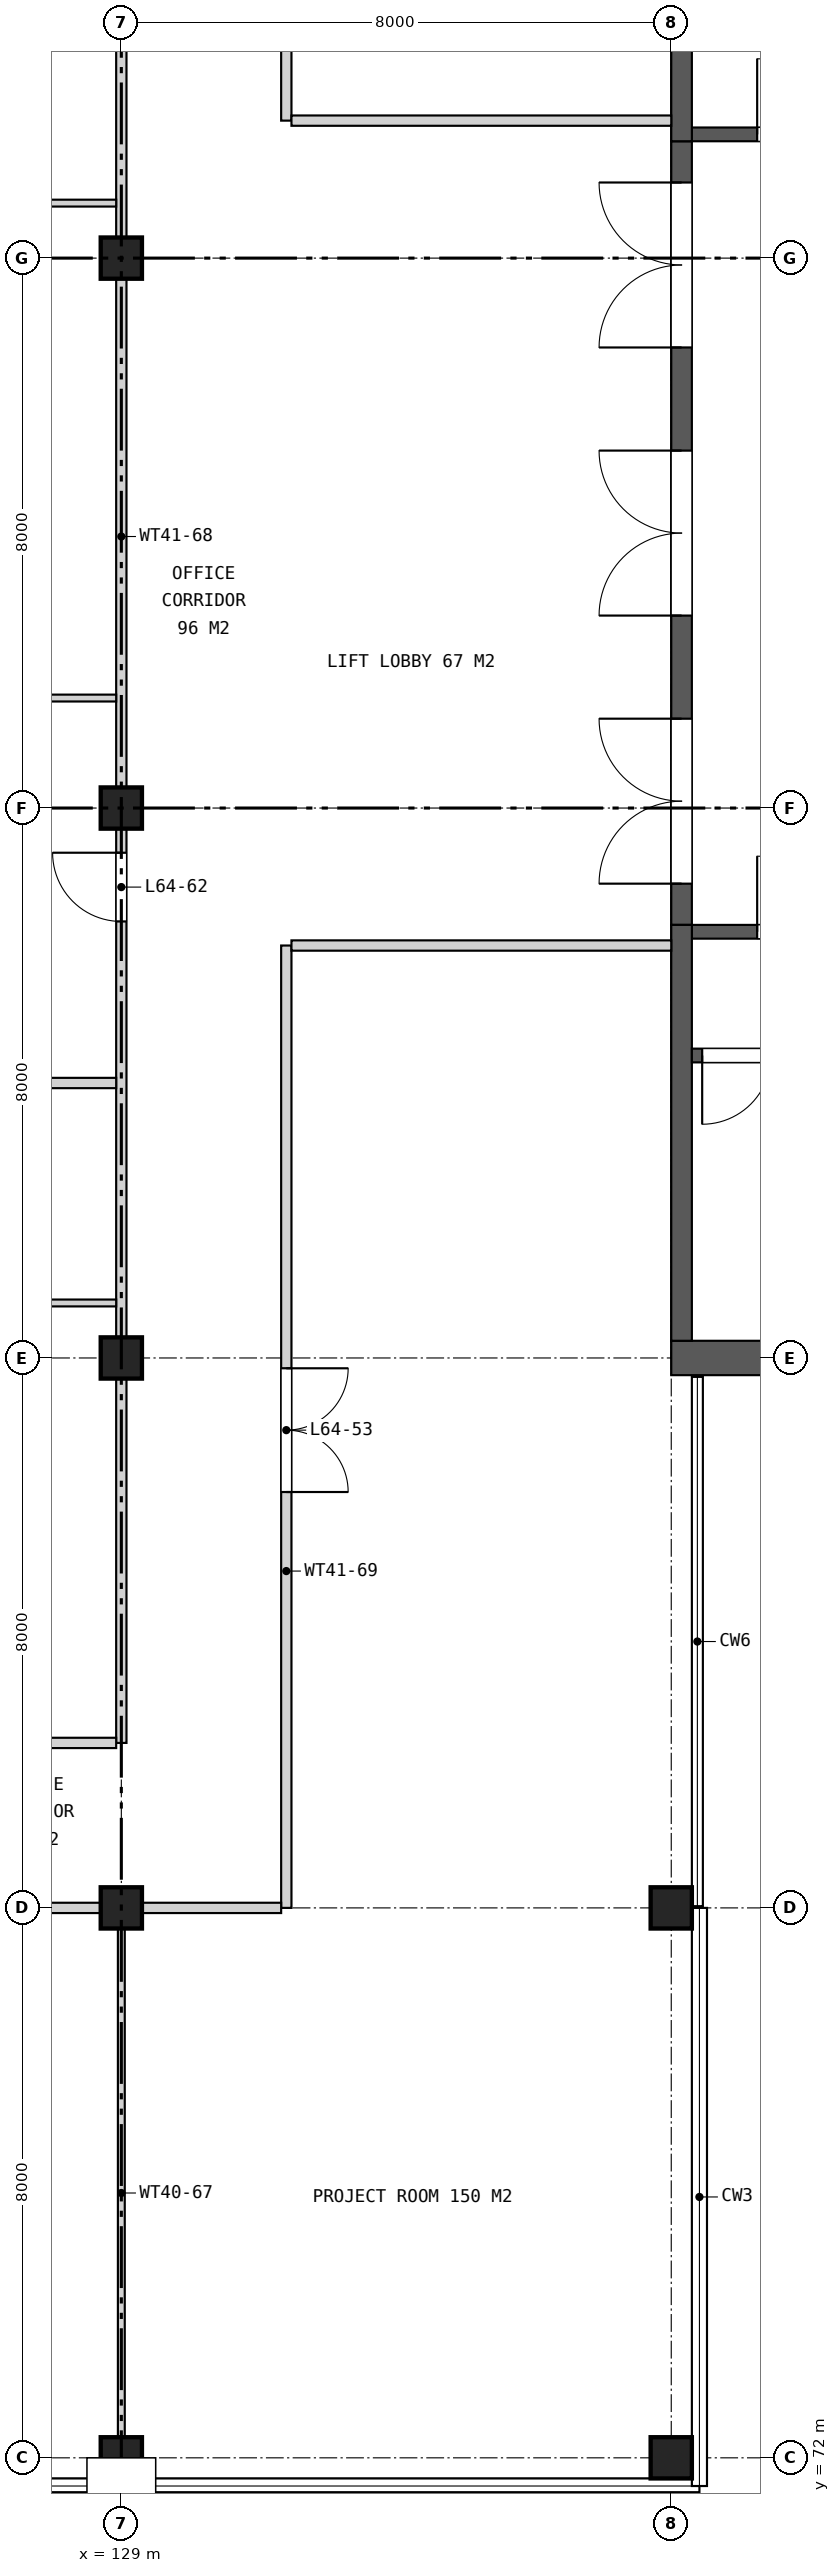
"""IFC4 building model, lengths in metres.
Left out: names, types, materials, properties, quantities, classifications, styles, units other than length and angle.
Written with IfcOpenShell. Run it as: python <this file> out.ifc"""

import sys

from ifc_helpers import new_model, si_unit, direction, frame, frame_2d, origin, origin_2d, place, context, subcontext, project, spatial, rectangle, extrude, element, fill, save


model = new_model("IFC4")
c1 = context("Model", 3, precision=1e-05, world=origin(), true_north=direction((0.0, 1.0)))
c2 = subcontext(c1, "Body", "Model", "MODEL_VIEW")
j1 = project(units=[si_unit("LENGTHUNIT", "METRE"), si_unit("PLANEANGLEUNIT", "RADIAN")], contexts=[c1])
p1 = place(None, origin())
s1 = spatial("IfcSite", under=j1, at=p1, CompositionType="ELEMENT")
p2 = place(p1, origin())
s2 = spatial("IfcBuilding", under=s1, at=p2, CompositionType="ELEMENT")
p3 = place(p2, frame((0.0, 0.0, 295.5)))
s3 = spatial("IfcBuildingStorey", under=s2, at=p3, CompositionType="ELEMENT", Elevation=295.5)
for number, where, z_axis, x_axis in (
    (1, (129.0, 72.0, 0.0), (0.0, 0.0, 1.0), (1.0, 0.0, 0.0)),
    (2, (129.0, 80.0, 0.0), (0.0, 0.0, 1.0), (1.0, 0.0, 0.0)),
    (3, (129.0, 88.0, 0.0), (0.0, 0.0, 1.0), (1.0, 0.0, 0.0)),
    (4, (129.0, 96.0, 0.0), (0.0, 0.0, 1.0), (1.0, 0.0, 0.0)),
    (5, (129.0, 104.0, 0.0), (0.0, 0.0, 1.0), (1.0, 0.0, 0.0)),
    (6, (137.0, 72.0, 0.0), (0.0, 0.0, 1.0), (1.0, 0.0, 0.0)),
    (7, (137.0, 80.0, 0.0), (0.0, 0.0, 1.0), (1.0, 0.0, 0.0)),
):
    element("IfcColumn", number, at=place(p3, frame(where, z_axis=z_axis, x_axis=x_axis)), inside=s3, PredefinedType="COLUMN", context=c2, shape_type="SweptSolid", body=[
        extrude(rectangle(XDim=0.6, YDim=0.6, at=origin_2d()), origin(), (0.0, 0.0, 1.0), 4.2),
    ])
p4 = place(p3, frame((137.0, 88.0, 0.0), z_axis=(0.0, 0.0, 1.0), x_axis=(1.0, 0.0, 0.0)))
e8 = element("IfcWall", 8, at=p4, inside=s3, PredefinedType="SHEAR", context=c2, shape_type="SweptSolid", body=[
    extrude(rectangle(XDim=7.1, YDim=0.5, at=frame_2d((3.55, 0.0))), origin(), (0.0, 0.0, 1.0), 4.2),
])
p5 = place(p3, frame((137.15, 94.3, 0.0), z_axis=(0.0, 0.0, 1.0), x_axis=(0.0, 1.0, 0.0)))
e9 = element("IfcWall", 9, at=p5, inside=s3, PredefinedType="SHEAR", context=c2, shape_type="SweptSolid", body=[
    extrude(rectangle(XDim=11.4, YDim=0.3, at=frame_2d((5.7, 0.0))), origin(), (0.0, 0.0, 1.0), 4.2),
])
p6 = place(p5, frame((0.6, 0.0, 0.0)))
e10 = element("IfcOpeningElement", 10, at=p6, cuts=e9, PredefinedType="OPENING", context=c2, shape_type="SweptSolid", body=[
    extrude(rectangle(XDim=2.4, YDim=2.4, at=frame_2d((1.2, 1.2))), frame((0.0, 0.16, 0.0), z_axis=(0.0, -1.0, 0.0), x_axis=(1.0, 0.0, 0.0)), (0.0, 0.0, 1.0), 0.32),
])
p7 = place(p5, frame((4.5, 0.0, 0.0)))
e11 = element("IfcOpeningElement", 11, at=p7, cuts=e9, PredefinedType="OPENING", context=c2, shape_type="SweptSolid", body=[
    extrude(rectangle(XDim=2.4, YDim=2.4, at=frame_2d((1.2, 1.2))), frame((0.0, 0.16, 0.0), z_axis=(0.0, -1.0, 0.0), x_axis=(1.0, 0.0, 0.0)), (0.0, 0.0, 1.0), 0.32),
])
p8 = place(p5, frame((8.4, 0.0, 0.0)))
e12 = element("IfcOpeningElement", 12, at=p8, cuts=e9, PredefinedType="OPENING", context=c2, shape_type="SweptSolid", body=[
    extrude(rectangle(XDim=2.4, YDim=2.4, at=frame_2d((1.2, 1.2))), frame((0.0, 0.16, 0.0), z_axis=(0.0, -1.0, 0.0), x_axis=(1.0, 0.0, 0.0)), (0.0, 0.0, 1.0), 0.32),
])
p9 = place(p3, frame((137.3, 105.8, 0.0), z_axis=(0.0, 0.0, 1.0), x_axis=(1.0, 0.0, 0.0)))
e13 = element("IfcWall", 13, at=p9, inside=s3, PredefinedType="SHEAR", context=c2, shape_type="SweptSolid", body=[
    extrude(rectangle(XDim=15.45, YDim=0.2, at=frame_2d((7.725, 0.0))), origin(), (0.0, 0.0, 1.0), 4.2),
])
p10 = place(p9, frame((0.95, 0.0, 0.0)))
e14 = element("IfcOpeningElement", 14, at=p10, cuts=e13, PredefinedType="OPENING", context=c2, shape_type="SweptSolid", body=[
    extrude(rectangle(XDim=1.1, YDim=2.1, at=frame_2d((0.55, 1.05))), frame((0.0, 0.11, 0.0), z_axis=(0.0, -1.0, 0.0), x_axis=(1.0, 0.0, 0.0)), (0.0, 0.0, 1.0), 0.22),
])
p11 = place(p3, frame((137.15, 105.7, 0.0), z_axis=(0.0, 0.0, 1.0), x_axis=(0.0, 1.0, 0.0)))
e15 = element("IfcWall", 15, at=p11, inside=s3, PredefinedType="SHEAR", context=c2, shape_type="SweptSolid", body=[
    extrude(rectangle(XDim=6.05, YDim=0.3, at=frame_2d((3.025, 0.0))), origin(), (0.0, 0.0, 1.0), 4.2),
])
p12 = place(p3, frame((137.3, 94.2, 0.0), z_axis=(0.0, 0.0, 1.0), x_axis=(1.0, 0.0, 0.0)))
e16 = element("IfcWall", 16, at=p12, inside=s3, PredefinedType="SHEAR", context=c2, shape_type="SweptSolid", body=[
    extrude(rectangle(XDim=15.45, YDim=0.2, at=frame_2d((7.725, 0.0))), origin(), (0.0, 0.0, 1.0), 4.2),
])
p13 = place(p12, frame((0.95, 0.0, 0.0)))
e17 = element("IfcOpeningElement", 17, at=p13, cuts=e16, PredefinedType="OPENING", context=c2, shape_type="SweptSolid", body=[
    extrude(rectangle(XDim=1.1, YDim=2.1, at=frame_2d((0.55, 1.05))), frame((0.0, 0.11, 0.0), z_axis=(0.0, -1.0, 0.0), x_axis=(1.0, 0.0, 0.0)), (0.0, 0.0, 1.0), 0.22),
])
p14 = place(p3, frame((137.15, 88.25, 0.0), z_axis=(0.0, 0.0, 1.0), x_axis=(0.0, 1.0, 0.0)))
e18 = element("IfcWall", 18, at=p14, inside=s3, PredefinedType="SHEAR", context=c2, shape_type="SweptSolid", body=[
    extrude(rectangle(XDim=6.05, YDim=0.3, at=frame_2d((3.025, 0.0))), origin(), (0.0, 0.0, 1.0), 4.2),
])
p15 = place(p3, frame((137.3, 92.4, 0.0), z_axis=(0.0, 0.0, 1.0), x_axis=(1.0, 0.0, 0.0)))
e19 = element("IfcWall", 19, at=p15, inside=s3, PredefinedType="SHEAR", context=c2, shape_type="SweptSolid", body=[
    extrude(rectangle(XDim=6.8, YDim=0.2, at=frame_2d((3.4, 0.0))), origin(), (0.0, 0.0, 1.0), 4.2),
])
p16 = place(p15, frame((0.15, 0.0, 0.0)))
e20 = element("IfcOpeningElement", 20, at=p16, cuts=e19, PredefinedType="OPENING", context=c2, shape_type="SweptSolid", body=[
    extrude(rectangle(XDim=1.0, YDim=2.1, at=frame_2d((0.5, 1.05))), frame((0.0, 0.11, 0.0), z_axis=(0.0, -1.0, 0.0), x_axis=(1.0, 0.0, 0.0)), (0.0, 0.0, 1.0), 0.22),
])
p17 = place(p3, frame((129.0, 71.78, 0.0), z_axis=(0.0, 0.0, 1.0), x_axis=(0.0, 1.0, 0.0)))
e21 = element("IfcWall", 21, at=p17, inside=s3, PredefinedType="PARTITIONING", context=c2, shape_type="SweptSolid", body=[
    extrude(rectangle(XDim=8.145, YDim=0.1, at=frame_2d((4.073, 0.0))), origin(), (0.0, 0.0, 1.0), 3.443),
])
p18 = place(p3, frame((129.0, 82.4, 0.0), z_axis=(0.0, 0.0, 1.0), x_axis=(0.0, 1.0, 0.0)))
e22 = element("IfcWall", 22, at=p18, inside=s3, PredefinedType="PARTITIONING", context=c2, shape_type="SweptSolid", body=[
    extrude(rectangle(XDim=35.1, YDim=0.15, at=frame_2d((17.55, 0.0))), origin(), (0.0, 0.0, 1.0), 3.443),
])
p19 = place(p18, frame((11.95, 0.0, 0.0)))
e23 = element("IfcOpeningElement", 23, at=p19, cuts=e22, PredefinedType="OPENING", context=c2, shape_type="SweptSolid", body=[
    extrude(rectangle(XDim=1.0, YDim=2.1, at=frame_2d((0.5, 1.05))), frame((0.0, 0.085, 0.0), z_axis=(0.0, -1.0, 0.0), x_axis=(1.0, 0.0, 0.0)), (0.0, 0.0, 1.0), 0.17),
])
p20 = place(p18, frame((24.65, 0.0, 0.0)))
e24 = element("IfcOpeningElement", 24, at=p20, cuts=e22, PredefinedType="OPENING", context=c2, shape_type="SweptSolid", body=[
    extrude(rectangle(XDim=1.0, YDim=2.1, at=frame_2d((0.5, 1.05))), frame((0.0, 0.085, 0.0), z_axis=(0.0, -1.0, 0.0), x_axis=(1.0, 0.0, 0.0)), (0.0, 0.0, 1.0), 0.17),
])
p21 = place(p3, frame((131.4, 80.0, 0.0), z_axis=(0.0, 0.0, 1.0), x_axis=(0.0, 1.0, 0.0)))
e25 = element("IfcWall", 25, at=p21, inside=s3, PredefinedType="PARTITIONING", context=c2, shape_type="SweptSolid", body=[
    extrude(rectangle(XDim=14.0, YDim=0.15, at=frame_2d((7.0, 0.0))), origin(), (0.0, 0.0, 1.0), 3.443),
])
p22 = place(p21, frame((6.05, 0.0, 0.0)))
e26 = element("IfcOpeningElement", 26, at=p22, cuts=e25, PredefinedType="OPENING", context=c2, shape_type="SweptSolid", body=[
    extrude(rectangle(XDim=1.8, YDim=2.1, at=frame_2d((0.9, 1.05))), frame((0.0, 0.085, 0.0), z_axis=(0.0, -1.0, 0.0), x_axis=(1.0, 0.0, 0.0)), (0.0, 0.0, 1.0), 0.17),
])
p23 = place(p3, frame((131.4, 106.0, 0.0), z_axis=(0.0, 0.0, 1.0), x_axis=(0.0, 1.0, 0.0)))
e27 = element("IfcWall", 27, at=p23, inside=s3, PredefinedType="PARTITIONING", context=c2, shape_type="SweptSolid", body=[
    extrude(rectangle(XDim=13.925, YDim=0.15, at=frame_2d((6.962, 0.0))), origin(), (0.0, 0.0, 1.0), 3.443),
])
p24 = place(p23, frame((1.25, 0.0, 0.0)))
e28 = element("IfcOpeningElement", 28, at=p24, cuts=e27, PredefinedType="OPENING", context=c2, shape_type="SweptSolid", body=[
    extrude(rectangle(XDim=1.0, YDim=2.1, at=frame_2d((0.5, 1.05))), frame((0.0, 0.085, 0.0), z_axis=(0.0, -1.0, 0.0), x_axis=(1.0, 0.0, 0.0)), (0.0, 0.0, 1.0), 0.17),
])
p25 = place(p23, frame((4.25, 0.0, 0.0)))
e29 = element("IfcOpeningElement", 29, at=p25, cuts=e27, PredefinedType="OPENING", context=c2, shape_type="SweptSolid", body=[
    extrude(rectangle(XDim=1.0, YDim=2.1, at=frame_2d((0.5, 1.05))), frame((0.0, 0.085, 0.0), z_axis=(0.0, -1.0, 0.0), x_axis=(1.0, 0.0, 0.0)), (0.0, 0.0, 1.0), 0.17),
])
p26 = place(p23, frame((9.45, 0.0, 0.0)))
e30 = element("IfcOpeningElement", 30, at=p26, cuts=e27, PredefinedType="OPENING", context=c2, shape_type="SweptSolid", body=[
    extrude(rectangle(XDim=1.0, YDim=2.1, at=frame_2d((0.5, 1.05))), frame((0.0, 0.085, 0.0), z_axis=(0.0, -1.0, 0.0), x_axis=(1.0, 0.0, 0.0)), (0.0, 0.0, 1.0), 0.17),
])
p27 = place(p3, frame((112.78, 80.0, 0.0), z_axis=(0.0, 0.0, 1.0), x_axis=(1.0, 0.0, 0.0)))
e31 = element("IfcWall", 31, at=p27, inside=s3, PredefinedType="PARTITIONING", context=c2, shape_type="SweptSolid", body=[
    extrude(rectangle(XDim=18.545, YDim=0.15, at=frame_2d((9.272, 0.0))), origin(), (0.0, 0.0, 1.0), 3.443),
])
p28 = place(p27, frame((11.27, 0.0, 0.0)))
e32 = element("IfcOpeningElement", 32, at=p28, cuts=e31, PredefinedType="OPENING", context=c2, shape_type="SweptSolid", body=[
    extrude(rectangle(XDim=1.8, YDim=2.1, at=frame_2d((0.9, 1.05))), frame((0.0, 0.085, 0.0), z_axis=(0.0, -1.0, 0.0), x_axis=(1.0, 0.0, 0.0)), (0.0, 0.0, 1.0), 0.17),
])
p29 = place(p3, frame((121.1, 82.4, 0.0), z_axis=(0.0, 0.0, 1.0), x_axis=(1.0, 0.0, 0.0)))
e33 = element("IfcWall", 33, at=p29, inside=s3, PredefinedType="PARTITIONING", context=c2, shape_type="SweptSolid", body=[
    extrude(rectangle(XDim=7.825, YDim=0.15, at=frame_2d((3.913, 0.0))), origin(), (0.0, 0.0, 1.0), 3.443),
])
p30 = place(p29, frame((3.45, 0.0, 0.0)))
e34 = element("IfcOpeningElement", 34, at=p30, cuts=e33, PredefinedType="OPENING", context=c2, shape_type="SweptSolid", body=[
    extrude(rectangle(XDim=1.0, YDim=2.1, at=frame_2d((0.5, 1.05))), frame((0.0, 0.085, 0.0), z_axis=(0.0, -1.0, 0.0), x_axis=(1.0, 0.0, 0.0)), (0.0, 0.0, 1.0), 0.17),
])
p31 = place(p3, frame((121.1, 88.8, 0.0), z_axis=(0.0, 0.0, 1.0), x_axis=(1.0, 0.0, 0.0)))
e35 = element("IfcWall", 35, at=p31, inside=s3, PredefinedType="PARTITIONING", context=c2, shape_type="SweptSolid", body=[
    extrude(rectangle(XDim=7.825, YDim=0.1, at=frame_2d((3.913, 0.0))), origin(), (0.0, 0.0, 1.0), 3.443),
])
p32 = place(p3, frame((121.1, 92.0, 0.0), z_axis=(0.0, 0.0, 1.0), x_axis=(1.0, 0.0, 0.0)))
e36 = element("IfcWall", 36, at=p32, inside=s3, PredefinedType="PARTITIONING", context=c2, shape_type="SweptSolid", body=[
    extrude(rectangle(XDim=7.825, YDim=0.15, at=frame_2d((3.913, 0.0))), origin(), (0.0, 0.0, 1.0), 3.443),
])
p33 = place(p3, frame((131.475, 94.0, 0.0), z_axis=(0.0, 0.0, 1.0), x_axis=(1.0, 0.0, 0.0)))
e37 = element("IfcWall", 37, at=p33, inside=s3, PredefinedType="PARTITIONING", context=c2, shape_type="SweptSolid", body=[
    extrude(rectangle(XDim=5.525, YDim=0.15, at=frame_2d((2.762, 0.0))), origin(), (0.0, 0.0, 1.0), 3.443),
])
for number, where, z_axis, x_axis in (
    (38, (121.1, 97.6, 0.0), (0.0, 0.0, 1.0), (1.0, 0.0, 0.0)),
    (39, (121.1, 104.8, 0.0), (0.0, 0.0, 1.0), (1.0, 0.0, 0.0)),
):
    element("IfcWall", number, at=place(p3, frame(where, z_axis=z_axis, x_axis=x_axis)), inside=s3, PredefinedType="PARTITIONING", context=c2, shape_type="SweptSolid", body=[
        extrude(rectangle(XDim=7.825, YDim=0.1, at=frame_2d((3.913, 0.0))), origin(), (0.0, 0.0, 1.0), 3.443),
    ])
p34 = place(p3, frame((131.475, 106.0, 0.0), z_axis=(0.0, 0.0, 1.0), x_axis=(1.0, 0.0, 0.0)))
e40 = element("IfcWall", 40, at=p34, inside=s3, PredefinedType="PARTITIONING", context=c2, shape_type="SweptSolid", body=[
    extrude(rectangle(XDim=5.525, YDim=0.15, at=frame_2d((2.762, 0.0))), origin(), (0.0, 0.0, 1.0), 3.443),
])
p35 = place(p6, origin())
e41 = element("IfcDoor", 41, at=p35, inside=s3, OperationType="DOUBLE_DOOR_SINGLE_SWING", PredefinedType="DOOR", context=c2, shape_type="SweptSolid", body=[
    extrude(rectangle(XDim=2.4, YDim=2.4, at=frame_2d((1.2, 1.2))), frame((0.0, 0.025, 0.0), z_axis=(0.0, -1.0, 0.0), x_axis=(1.0, 0.0, 0.0)), (0.0, 0.0, 1.0), 0.05),
])
fill(e10, e41)
p36 = place(p7, origin())
e42 = element("IfcDoor", 42, at=p36, inside=s3, OperationType="DOUBLE_DOOR_SINGLE_SWING", PredefinedType="DOOR", context=c2, shape_type="SweptSolid", body=[
    extrude(rectangle(XDim=2.4, YDim=2.4, at=frame_2d((1.2, 1.2))), frame((0.0, 0.025, 0.0), z_axis=(0.0, -1.0, 0.0), x_axis=(1.0, 0.0, 0.0)), (0.0, 0.0, 1.0), 0.05),
])
fill(e11, e42)
p37 = place(p8, origin())
e43 = element("IfcDoor", 43, at=p37, inside=s3, OperationType="DOUBLE_DOOR_SINGLE_SWING", PredefinedType="DOOR", context=c2, shape_type="SweptSolid", body=[
    extrude(rectangle(XDim=2.4, YDim=2.4, at=frame_2d((1.2, 1.2))), frame((0.0, 0.025, 0.0), z_axis=(0.0, -1.0, 0.0), x_axis=(1.0, 0.0, 0.0)), (0.0, 0.0, 1.0), 0.05),
])
fill(e12, e43)
p38 = place(p10, origin())
e44 = element("IfcDoor", 44, at=p38, inside=s3, OperationType="SINGLE_SWING_LEFT", PredefinedType="DOOR", context=c2, shape_type="SweptSolid", body=[
    extrude(rectangle(XDim=1.1, YDim=2.1, at=frame_2d((0.55, 1.05))), frame((0.0, 0.025, 0.0), z_axis=(0.0, -1.0, 0.0), x_axis=(1.0, 0.0, 0.0)), (0.0, 0.0, 1.0), 0.05),
])
fill(e14, e44)
p39 = place(p13, origin())
e45 = element("IfcDoor", 45, at=p39, inside=s3, OperationType="SINGLE_SWING_LEFT", PredefinedType="DOOR", context=c2, shape_type="SweptSolid", body=[
    extrude(rectangle(XDim=1.1, YDim=2.1, at=frame_2d((0.55, 1.05))), frame((0.0, 0.025, 0.0), z_axis=(0.0, -1.0, 0.0), x_axis=(1.0, 0.0, 0.0)), (0.0, 0.0, 1.0), 0.05),
])
fill(e17, e45)
p40 = place(p16, frame((1.0, 0.0, 0.0), z_axis=(0.0, 0.0, 1.0), x_axis=(-1.0, 0.0, 0.0)))
e46 = element("IfcDoor", 46, at=p40, inside=s3, OperationType="SINGLE_SWING_RIGHT", PredefinedType="DOOR", context=c2, shape_type="SweptSolid", body=[
    extrude(rectangle(XDim=1.0, YDim=2.1, at=frame_2d((0.5, 1.05))), frame((0.0, 0.025, 0.0), z_axis=(0.0, -1.0, 0.0), x_axis=(1.0, 0.0, 0.0)), (0.0, 0.0, 1.0), 0.05),
])
fill(e20, e46)
p41 = place(p22, frame((1.8, 0.0, 0.0), z_axis=(0.0, 0.0, 1.0), x_axis=(-1.0, 0.0, 0.0)))
e47 = element("IfcDoor", 47, at=p41, inside=s3, OperationType="DOUBLE_DOOR_SINGLE_SWING", PredefinedType="DOOR", context=c2, shape_type="SweptSolid", body=[
    extrude(rectangle(XDim=1.8, YDim=2.1, at=frame_2d((0.9, 1.05))), frame((0.0, 0.025, 0.0), z_axis=(0.0, -1.0, 0.0), x_axis=(1.0, 0.0, 0.0)), (0.0, 0.0, 1.0), 0.05),
])
fill(e26, e47)
p42 = place(p19, origin())
e48 = element("IfcDoor", 48, at=p42, inside=s3, OperationType="SINGLE_SWING_RIGHT", PredefinedType="DOOR", context=c2, shape_type="SweptSolid", body=[
    extrude(rectangle(XDim=1.0, YDim=2.1, at=frame_2d((0.5, 1.05))), frame((0.0, 0.025, 0.0), z_axis=(0.0, -1.0, 0.0), x_axis=(1.0, 0.0, 0.0)), (0.0, 0.0, 1.0), 0.05),
])
fill(e23, e48)
save(model, sys.argv[1])
